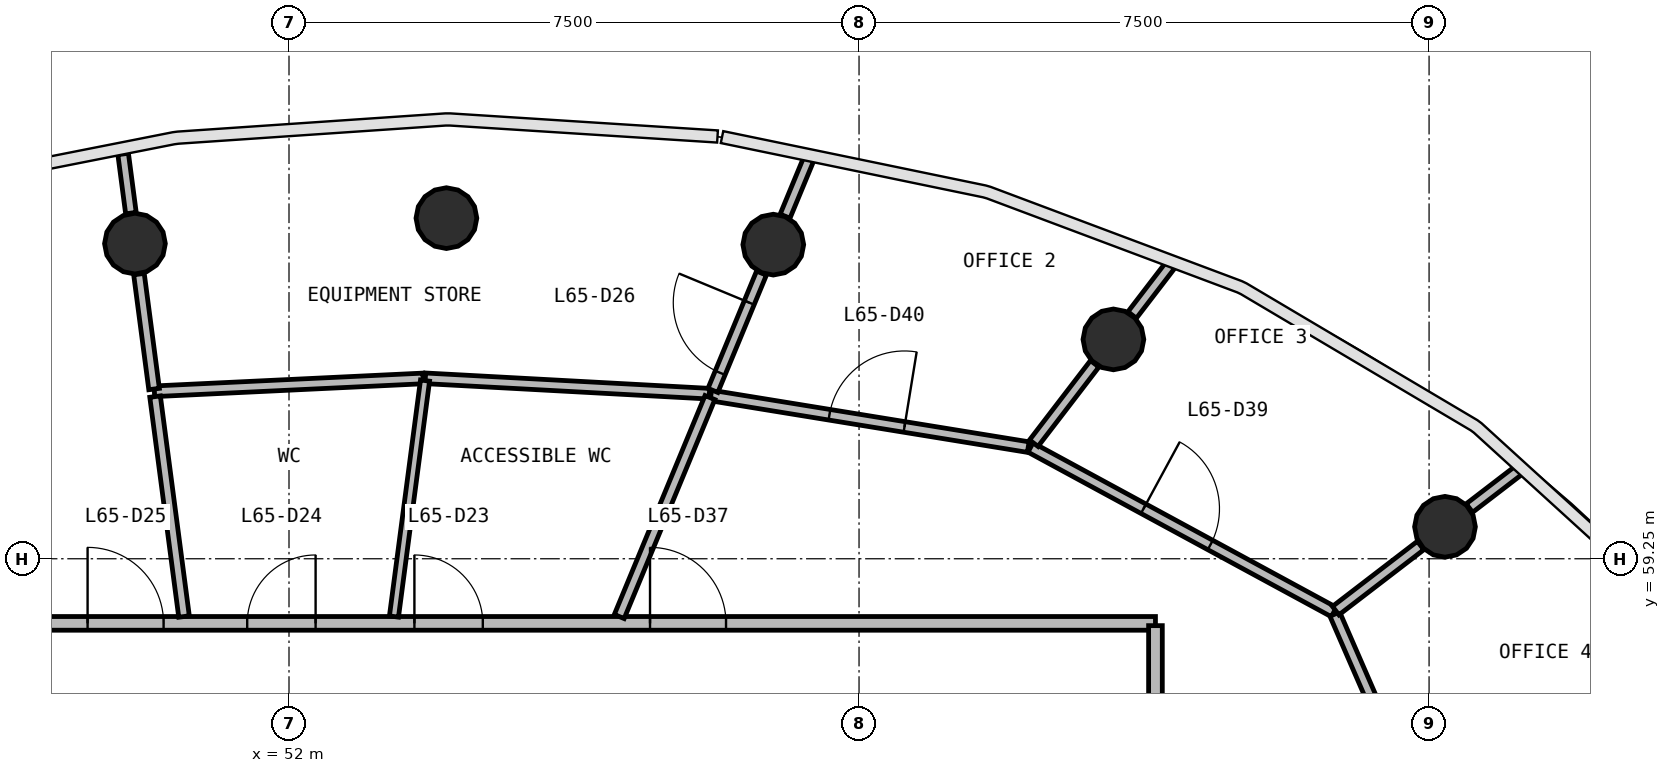
"""IFC4 building model, lengths in metres.
Left out: names, types, materials, properties, quantities, classifications, styles, units other than length and angle.
Written with IfcOpenShell. Run it as: python <this file> out.ifc"""

import sys

from ifc_helpers import new_model, si_unit, direction, frame, frame_2d, origin, origin_2d, place, context, subcontext, project, spatial, rectangle, circle, extrude, source, transform, mapped, element, fill, save


model = new_model("IFC4")
c1 = context("Model", 3, precision=1e-05, world=origin(), true_north=direction((0.0, 1.0)))
c2 = subcontext(c1, "Body", "Model", "MODEL_VIEW")
j1 = project(units=[si_unit("LENGTHUNIT", "METRE"), si_unit("PLANEANGLEUNIT", "RADIAN")], contexts=[c1])
p1 = place(None, origin())
s1 = spatial("IfcSite", under=j1, at=p1, CompositionType="ELEMENT")
p2 = place(p1, origin())
s2 = spatial("IfcBuilding", under=s1, at=p2, CompositionType="ELEMENT")
p3 = place(p2, frame((0.0, 0.0, 265.7)))
s3 = spatial("IfcBuildingStorey", under=s2, at=p3, CompositionType="ELEMENT", Elevation=265.7)
m1 = source(origin(), c2, "Body", "SweptSolid", [
    extrude(circle(Radius=0.4, at=origin_2d()), origin(), (0.0, 0.0, 1.0), 3.9),
])
for number, where, z_axis, x_axis in (
    (1, (67.209, 59.671, 0.0), (0.0, 0.0, 1.0), (1.0, 0.0, 0.0)),
    (2, (62.847, 62.136, 0.0), (0.0, 0.0, 1.0), (1.0, 0.0, 0.0)),
    (3, (58.372, 63.383, 0.0), (0.0, 0.0, 1.0), (1.0, 0.0, 0.0)),
    (4, (54.071, 63.731, 0.0), (0.0, 0.0, 1.0), (1.0, 0.0, 0.0)),
    (5, (49.973, 63.396, 0.0), (0.0, 0.0, 1.0), (1.0, 0.0, 0.0)),
):
    element("IfcColumn", number, at=place(p3, frame(where, z_axis=z_axis, x_axis=x_axis)), inside=s3, PredefinedType="COLUMN", context=c2, shape_type="MappedRepresentation", body=[
        mapped(m1, transform((0.0, 0.0, 0.0), scale=1.0)),
    ])
p4 = place(p3, frame((40.6, 58.4, 0.0), z_axis=(0.0, 0.0, 1.0), x_axis=(1.0, 0.0, 0.0)))
e6 = element("IfcWall", 6, at=p4, inside=s3, PredefinedType="PARTITIONING", context=c2, shape_type="SweptSolid", body=[
    extrude(rectangle(XDim=22.8, YDim=0.18, at=frame_2d((11.4, 0.0))), origin(), (0.0, 0.0, 1.0), 2.92),
])
p5 = place(p4, frame((13.05, 0.0, 0.0)))
e7 = element("IfcOpeningElement", 7, at=p5, cuts=e6, PredefinedType="OPENING", context=c2, shape_type="SweptSolid", body=[
    extrude(rectangle(XDim=0.9, YDim=2.1, at=frame_2d((0.45, 1.05))), frame((0.0, 0.1, 0.0), z_axis=(0.0, -1.0, 0.0), x_axis=(1.0, 0.0, 0.0)), (0.0, 0.0, 1.0), 0.2),
])
p6 = place(p4, frame((10.85, 0.0, 0.0)))
e8 = element("IfcOpeningElement", 8, at=p6, cuts=e6, PredefinedType="OPENING", context=c2, shape_type="SweptSolid", body=[
    extrude(rectangle(XDim=0.9, YDim=2.1, at=frame_2d((0.45, 1.05))), frame((0.0, 0.1, 0.0), z_axis=(0.0, -1.0, 0.0), x_axis=(1.0, 0.0, 0.0)), (0.0, 0.0, 1.0), 0.2),
])
p7 = place(p4, frame((8.75, 0.0, 0.0)))
e9 = element("IfcOpeningElement", 9, at=p7, cuts=e6, PredefinedType="OPENING", context=c2, shape_type="SweptSolid", body=[
    extrude(rectangle(XDim=1.0, YDim=2.1, at=frame_2d((0.5, 1.05))), frame((0.0, 0.1, 0.0), z_axis=(0.0, -1.0, 0.0), x_axis=(1.0, 0.0, 0.0)), (0.0, 0.0, 1.0), 0.2),
])
p8 = place(p4, frame((16.15, 0.0, 0.0)))
e10 = element("IfcOpeningElement", 10, at=p8, cuts=e6, PredefinedType="OPENING", context=c2, shape_type="SweptSolid", body=[
    extrude(rectangle(XDim=1.0, YDim=2.1, at=frame_2d((0.5, 1.05))), frame((0.0, 0.1, 0.0), z_axis=(0.0, -1.0, 0.0), x_axis=(1.0, 0.0, 0.0)), (0.0, 0.0, 1.0), 0.2),
])
p9 = place(p3, frame((63.4, 58.37, 0.0), z_axis=(0.0, 0.0, 1.0), x_axis=(0.0, -1.0, 0.0)))
e11 = element("IfcWall", 11, at=p9, inside=s3, PredefinedType="PARTITIONING", context=c2, shape_type="SweptSolid", body=[
    extrude(rectangle(XDim=20.74, YDim=0.18, at=frame_2d((10.37, 0.0))), origin(), (0.0, 0.0, 1.0), 2.92),
])
p10 = place(p9, frame((9.89, 0.0, 0.0)))
e12 = element("IfcOpeningElement", 12, at=p10, cuts=e11, PredefinedType="OPENING", context=c2, shape_type="SweptSolid", body=[
    extrude(rectangle(XDim=1.0, YDim=2.1, at=frame_2d((0.5, 1.05))), frame((0.0, 0.1, 0.0), z_axis=(0.0, -1.0, 0.0), x_axis=(1.0, 0.0, 0.0)), (0.0, 0.0, 1.0), 0.2),
])
p11 = place(p3, frame((61.756, 60.714, 0.0), z_axis=(0.0, 0.0, 1.0), x_axis=(0.879039493049, -0.47674895874, 0.0)))
e13 = element("IfcWall", 13, at=p11, inside=s3, PredefinedType="PARTITIONING", context=c2, shape_type="SweptSolid", body=[
    extrude(rectangle(XDim=4.541, YDim=0.14, at=frame_2d((2.271, 0.0))), origin(), (0.0, 0.0, 1.0), 2.92),
])
p12 = place(p11, frame((1.691, 0.0, 0.0)))
e14 = element("IfcOpeningElement", 14, at=p12, cuts=e13, PredefinedType="OPENING", context=c2, shape_type="SweptSolid", body=[
    extrude(rectangle(XDim=1.0, YDim=2.1, at=frame_2d((0.5, 1.05))), frame((0.0, 0.08, 0.0), z_axis=(0.0, -1.0, 0.0), x_axis=(1.0, 0.0, 0.0)), (0.0, 0.0, 1.0), 0.16),
])
p13 = place(p3, frame((65.76, 58.521, 0.0), z_axis=(0.0, 0.0, 1.0), x_axis=(0.398952504151, -0.916971591398, 0.0)))
e15 = element("IfcWall", 15, at=p13, inside=s3, PredefinedType="PARTITIONING", context=c2, shape_type="SweptSolid", body=[
    extrude(rectangle(XDim=4.456, YDim=0.14, at=frame_2d((2.228, 0.0))), origin(), (0.0, 0.0, 1.0), 2.92),
])
p14 = place(p13, frame((1.806, 0.0, 0.0)))
e16 = element("IfcOpeningElement", 16, at=p14, cuts=e15, PredefinedType="OPENING", context=c2, shape_type="SweptSolid", body=[
    extrude(rectangle(XDim=1.0, YDim=2.1, at=frame_2d((0.5, 1.05))), frame((0.0, 0.08, 0.0), z_axis=(0.0, -1.0, 0.0), x_axis=(1.0, 0.0, 0.0)), (0.0, 0.0, 1.0), 0.16),
])
p15 = place(p3, frame((57.55, 61.398, 0.0), z_axis=(0.0, 0.0, 1.0), x_axis=(0.987024287771, -0.160571028986, 0.0)))
e17 = element("IfcWall", 17, at=p15, inside=s3, PredefinedType="PARTITIONING", context=c2, shape_type="SweptSolid", body=[
    extrude(rectangle(XDim=4.231, YDim=0.14, at=frame_2d((2.116, 0.0))), origin(), (0.0, 0.0, 1.0), 2.92),
])
p16 = place(p15, frame((1.581, 0.0, 0.0)))
e18 = element("IfcOpeningElement", 18, at=p16, cuts=e17, PredefinedType="OPENING", context=c2, shape_type="SweptSolid", body=[
    extrude(rectangle(XDim=1.0, YDim=2.1, at=frame_2d((0.5, 1.05))), frame((0.0, 0.08, 0.0), z_axis=(0.0, -1.0, 0.0), x_axis=(1.0, 0.0, 0.0)), (0.0, 0.0, 1.0), 0.16),
])
p17 = place(p3, frame((57.531, 61.421, 0.0), z_axis=(0.0, 0.0, 1.0), x_axis=(-0.998536661474, 0.05407897644, 0.0)))
e19 = element("IfcWall", 19, at=p17, inside=s3, PredefinedType="PARTITIONING", context=c2, shape_type="SweptSolid", body=[
    extrude(rectangle(XDim=3.742, YDim=0.14, at=frame_2d((1.871, 0.0))), origin(), (0.0, 0.0, 1.0), 2.92),
])
p18 = place(p3, frame((53.764, 61.622, 0.0), z_axis=(0.0, 0.0, 1.0), x_axis=(-0.998856400799, -0.047810988103, 0.0)))
e20 = element("IfcWall", 20, at=p18, inside=s3, PredefinedType="PARTITIONING", context=c2, shape_type="SweptSolid", body=[
    extrude(rectangle(XDim=3.539, YDim=0.14, at=frame_2d((1.77, 0.0))), origin(), (0.0, 0.0, 1.0), 2.92),
])
p19 = place(p3, frame((56.345, 58.49, 0.0), z_axis=(0.0, 0.0, 1.0), x_axis=(0.382635311625, 0.923899463306, 0.0)))
e21 = element("IfcWall", 21, at=p19, inside=s3, PredefinedType="PARTITIONING", context=c2, shape_type="SweptSolid", body=[
    extrude(rectangle(XDim=3.118, YDim=0.14, at=frame_2d((1.559, 0.0))), origin(), (0.0, 0.0, 1.0), 2.92),
])
p20 = place(p3, frame((50.619, 58.49, 0.0), z_axis=(0.0, 0.0, 1.0), x_axis=(-0.130497790763, 0.991448600083, 0.0)))
e22 = element("IfcWall", 22, at=p20, inside=s3, PredefinedType="PARTITIONING", context=c2, shape_type="SweptSolid", body=[
    extrude(rectangle(XDim=2.918, YDim=0.14, at=frame_2d((1.459, 0.0))), origin(), (0.0, 0.0, 1.0), 2.92),
])
p21 = place(p3, frame((57.577, 61.465, 0.0), z_axis=(0.0, 0.0, 1.0), x_axis=(0.3827260732, 0.923861868946, 0.0)))
e23 = element("IfcWall", 23, at=p21, inside=s3, PredefinedType="PARTITIONING", context=c2, shape_type="SweptSolid", body=[
    extrude(rectangle(XDim=1.671, YDim=0.14, at=frame_2d((0.835, 0.0))), origin(), (0.0, 0.0, 1.0), 2.92),
])
p22 = place(p21, frame((0.25, 0.0, 0.0)))
e24 = element("IfcOpeningElement", 24, at=p22, cuts=e23, PredefinedType="OPENING", context=c2, shape_type="SweptSolid", body=[
    extrude(rectangle(XDim=1.0, YDim=2.1, at=frame_2d((0.5, 1.05))), frame((0.0, 0.08, 0.0), z_axis=(0.0, -1.0, 0.0), x_axis=(1.0, 0.0, 0.0)), (0.0, 0.0, 1.0), 0.16),
])
p23 = place(p3, frame((50.225, 61.483, 0.0), z_axis=(0.0, 0.0, 1.0), x_axis=(-0.130454512571, 0.991454295543, 0.0)))
e25 = element("IfcWall", 25, at=p23, inside=s3, PredefinedType="PARTITIONING", context=c2, shape_type="SweptSolid", body=[
    extrude(rectangle(XDim=1.525, YDim=0.14, at=frame_2d((0.763, 0.0))), origin(), (0.0, 0.0, 1.0), 2.92),
])
p24 = place(p3, frame((65.771, 58.567, 0.0), z_axis=(0.0, 0.0, 1.0), x_axis=(0.793313221417, 0.608813709376, 0.0)))
e26 = element("IfcWall", 26, at=p24, inside=s3, PredefinedType="PARTITIONING", context=c2, shape_type="SweptSolid", body=[
    extrude(rectangle(XDim=1.408, YDim=0.14, at=frame_2d((0.704, 0.0))), origin(), (0.0, 0.0, 1.0), 2.92),
])
p25 = place(p3, frame((61.799, 60.771, 0.0), z_axis=(0.0, 0.0, 1.0), x_axis=(0.608805214603, 0.793319740503, 0.0)))
e27 = element("IfcWall", 27, at=p25, inside=s3, PredefinedType="PARTITIONING", context=c2, shape_type="SweptSolid", body=[
    extrude(rectangle(XDim=1.317, YDim=0.14, at=frame_2d((0.658, 0.0))), origin(), (0.0, 0.0, 1.0), 2.92),
])
p26 = place(p3, frame((63.093, 62.457, 0.0), z_axis=(0.0, 0.0, 1.0), x_axis=(0.608728266511, 0.79337878567, 0.0)))
e28 = element("IfcWall", 28, at=p26, inside=s3, PredefinedType="PARTITIONING", context=c2, shape_type="SweptSolid", body=[
    extrude(rectangle(XDim=0.829, YDim=0.14, at=frame_2d((0.415, 0.0))), origin(), (0.0, 0.0, 1.0), 2.92),
])
p27 = place(p3, frame((67.531, 59.917, 0.0), z_axis=(0.0, 0.0, 1.0), x_axis=(0.793396032013, 0.608705788034, 0.0)))
e29 = element("IfcWall", 29, at=p27, inside=s3, PredefinedType="PARTITIONING", context=c2, shape_type="SweptSolid", body=[
    extrude(rectangle(XDim=0.822, YDim=0.14, at=frame_2d((0.411, 0.0))), origin(), (0.0, 0.0, 1.0), 2.92),
])
p28 = place(p3, frame((58.527, 63.757, 0.0), z_axis=(0.0, 0.0, 1.0), x_axis=(0.382846417199, 0.923812005138, 0.0)))
e30 = element("IfcWall", 30, at=p28, inside=s3, PredefinedType="PARTITIONING", context=c2, shape_type="SweptSolid", body=[
    extrude(rectangle(XDim=0.814, YDim=0.14, at=frame_2d((0.407, 0.0))), origin(), (0.0, 0.0, 1.0), 2.92),
])
p29 = place(p3, frame((49.92, 63.797, 0.0), z_axis=(0.0, 0.0, 1.0), x_axis=(-0.130575144093, 0.991438415508, 0.0)))
e31 = element("IfcWall", 31, at=p29, inside=s3, PredefinedType="PARTITIONING", context=c2, shape_type="SweptSolid", body=[
    extrude(rectangle(XDim=0.785, YDim=0.14, at=frame_2d((0.393, 0.0))), origin(), (0.0, 0.0, 1.0), 2.92),
])
p30 = place(p3, frame((53.381, 58.49, 0.0), z_axis=(0.0, 0.0, 1.0), x_axis=(0.130529142565, 0.991444472949, 0.0)))
e32 = element("IfcWall", 32, at=p30, inside=s3, PredefinedType="PARTITIONING", context=c2, shape_type="SweptSolid", body=[
    extrude(rectangle(XDim=3.131, YDim=0.12, at=frame_2d((1.565, 0.0))), origin(), (0.0, 0.0, 1.0), 2.92),
])
m2 = source(origin(), c2, "Body", "SweptSolid", [
    extrude(rectangle(XDim=0.9, YDim=2.1, at=frame_2d((0.45, 1.05))), frame((0.0, 0.025, 0.0), z_axis=(0.0, -1.0, 0.0), x_axis=(1.0, 0.0, 0.0)), (0.0, 0.0, 1.0), 0.05),
])
p31 = place(p5, origin())
e33 = element("IfcDoor", 33, at=p31, inside=s3, OperationType="SINGLE_SWING_LEFT", PredefinedType="DOOR", context=c2, shape_type="MappedRepresentation", body=[
    mapped(m2, transform((0.0, 0.0, 0.0), scale=1.0)),
])
fill(e7, e33)
p32 = place(p6, origin())
e34 = element("IfcDoor", 34, at=p32, inside=s3, OperationType="SINGLE_SWING_RIGHT", PredefinedType="DOOR", context=c2, shape_type="MappedRepresentation", body=[
    mapped(m2, transform((0.0, 0.0, 0.0), scale=1.0)),
])
fill(e8, e34)
m3 = source(origin(), c2, "Body", "SweptSolid", [
    extrude(rectangle(XDim=1.0, YDim=2.1, at=frame_2d((0.5, 1.05))), frame((0.0, 0.025, 0.0), z_axis=(0.0, -1.0, 0.0), x_axis=(1.0, 0.0, 0.0)), (0.0, 0.0, 1.0), 0.05),
])
p33 = place(p7, origin())
e35 = element("IfcDoor", 35, at=p33, inside=s3, OperationType="SINGLE_SWING_LEFT", PredefinedType="DOOR", context=c2, shape_type="MappedRepresentation", body=[
    mapped(m3, transform((0.0, 0.0, 0.0), scale=1.0)),
])
fill(e9, e35)
p34 = place(p22, origin())
e36 = element("IfcDoor", 36, at=p34, inside=s3, OperationType="SINGLE_SWING_RIGHT", PredefinedType="DOOR", context=c2, shape_type="MappedRepresentation", body=[
    mapped(m3, transform((0.0, 0.0, 0.0), scale=1.0)),
])
fill(e24, e36)
p35 = place(p8, origin())
e37 = element("IfcDoor", 37, at=p35, inside=s3, OperationType="SINGLE_SWING_LEFT", PredefinedType="DOOR", context=c2, shape_type="MappedRepresentation", body=[
    mapped(m3, transform((0.0, 0.0, 0.0), scale=1.0)),
])
fill(e10, e37)
p36 = place(p12, origin())
e38 = element("IfcDoor", 38, at=p36, inside=s3, OperationType="SINGLE_SWING_LEFT", PredefinedType="DOOR", context=c2, shape_type="MappedRepresentation", body=[
    mapped(m3, transform((0.0, 0.0, 0.0), scale=1.0)),
])
fill(e14, e38)
p37 = place(p16, origin())
e39 = element("IfcDoor", 39, at=p37, inside=s3, OperationType="SINGLE_SWING_RIGHT", PredefinedType="DOOR", context=c2, shape_type="MappedRepresentation", body=[
    mapped(m3, transform((0.0, 0.0, 0.0), scale=1.0)),
])
fill(e18, e39)
save(model, sys.argv[1])
